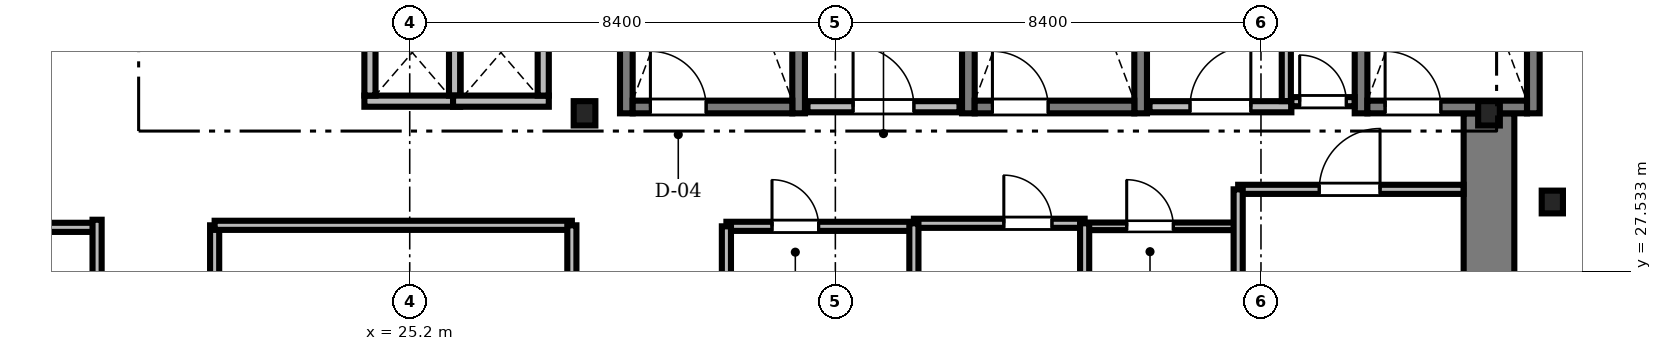
"""IFC4 building model, lengths in metres.
Left out: names, types, materials, properties, quantities, classifications, styles, units other than length and angle.
Written with IfcOpenShell. Run it as: python <this file> out.ifc"""

import sys

from ifc_helpers import new_model, si_unit, direction, frame, frame_2d, origin, origin_2d, place, context, subcontext, project, spatial, rectangle, i_section, extrude, source, transform, mapped, element, fill, save


model = new_model("IFC4")
c1 = context("Model", 3, precision=1e-05, world=origin(), true_north=direction((0.0, 1.0)))
c2 = subcontext(c1, "Body", "Model", "MODEL_VIEW")
j1 = project(units=[si_unit("LENGTHUNIT", "METRE"), si_unit("PLANEANGLEUNIT", "RADIAN")], contexts=[c1])
p1 = place(None, origin())
s1 = spatial("IfcSite", under=j1, at=p1, CompositionType="ELEMENT")
p2 = place(p1, origin())
s2 = spatial("IfcBuilding", under=s1, at=p2, CompositionType="ELEMENT")
p3 = place(p2, frame((0.0, 0.0, 45.85)))
s3 = spatial("IfcBuildingStorey", under=s2, at=p3, CompositionType="ELEMENT", Elevation=45.85)
m1 = source(origin(), c2, "Body", "SweptSolid", [
    extrude(rectangle(XDim=13.15, YDim=1.0, at=frame_2d((6.575, 0.0))), origin(), (0.0, 0.0, 1.0), 3.41),
])
p4 = place(p3, frame((46.5, 17.5, 0.0), z_axis=(0.0, 0.0, 1.0), x_axis=(0.0, 1.0, 0.0)))
e1 = element("IfcWall", 1, at=p4, inside=s3, PredefinedType="SHEAR", context=c2, shape_type="MappedRepresentation", body=[
    mapped(m1, transform((0.0, 0.0, 0.0), scale=1.0)),
])
m2 = source(origin(), c2, "Body", "SweptSolid", [
    extrude(i_section(OverallWidth=0.428, OverallDepth=0.481, WebThickness=0.04, FlangeThickness=0.063, FilletRadius=0.015, at=origin_2d()), origin(), (0.0, 0.0, 1.0), 3.41),
])
for number, where, z_axis, x_axis in (
    (2, (28.65, 30.65, 0.0), (0.0, 0.0, 1.0), (1.0, 0.0, 0.0)),
    (3, (46.5, 30.65, 0.0), (0.0, 0.0, 1.0), (1.0, 0.0, 0.0)),
):
    element("IfcColumn", number, at=place(p3, frame(where, z_axis=z_axis, x_axis=x_axis)), inside=s3, PredefinedType="COLUMN", context=c2, shape_type="MappedRepresentation", body=[
        mapped(m2, transform((0.0, 0.0, 0.0), scale=1.0)),
    ])
m3 = source(origin(), c2, "Body", "SweptSolid", [
    extrude(i_section(OverallWidth=0.419, OverallDepth=0.449, WebThickness=0.031, FlangeThickness=0.048, FilletRadius=0.015, at=origin_2d()), origin(), (0.0, 0.0, 1.0), 3.41),
])
p5 = place(p3, frame((47.75, 28.9, 0.0), z_axis=(0.0, 0.0, 1.0), x_axis=(1.0, 0.0, 0.0)))
e4 = element("IfcColumn", 4, at=p5, inside=s3, PredefinedType="COLUMN", context=c2, shape_type="MappedRepresentation", body=[
    mapped(m3, transform((0.0, 0.0, 0.0), scale=1.0)),
])
m4 = source(origin(), c2, "Body", "SweptSolid", [
    extrude(rectangle(XDim=9.15, YDim=0.25, at=frame_2d((4.575, 0.0))), origin(), (0.0, 0.0, 1.0), 3.45),
])
for number, where, z_axis, x_axis in (
    (5, (29.475, 30.65, 0.0), (0.0, 0.0, 1.0), (0.0, 1.0, 0.0)),
    (6, (32.875, 30.65, 0.0), (0.0, 0.0, 1.0), (0.0, 1.0, 0.0)),
):
    element("IfcWall", number, at=place(p3, frame(where, z_axis=z_axis, x_axis=x_axis)), inside=s3, PredefinedType="SOLIDWALL", context=c2, shape_type="MappedRepresentation", body=[
        mapped(m4, transform((0.0, 0.0, 0.0), scale=1.0)),
    ])
m5 = source(origin(), c2, "Body", "SweptSolid", [
    extrude(rectangle(XDim=3.15, YDim=0.25, at=frame_2d((1.575, 0.0))), origin(), (0.0, 0.0, 1.0), 3.45),
])
p6 = place(p3, frame((29.6, 30.775, 0.0), z_axis=(0.0, 0.0, 1.0), x_axis=(1.0, 0.0, 0.0)))
e7 = element("IfcWall", 7, at=p6, inside=s3, PredefinedType="SOLIDWALL", context=c2, shape_type="MappedRepresentation", body=[
    mapped(m5, transform((0.0, 0.0, 0.0), scale=1.0)),
])
m6 = source(origin(), c2, "Body", "SweptSolid", [
    extrude(rectangle(XDim=1.1, YDim=2.2, at=frame_2d((0.55, 1.1))), frame((0.0, 0.135, 0.0), z_axis=(0.0, -1.0, 0.0), x_axis=(1.0, 0.0, 0.0)), (0.0, 0.0, 1.0), 0.27),
])
p7 = place(p6, frame((0.35, 0.0, 0.0)))
e8 = element("IfcOpeningElement", 8, at=p7, cuts=e7, PredefinedType="OPENING", context=c2, shape_type="MappedRepresentation", body=[
    mapped(m6, transform((0.0, 0.0, 0.0), scale=1.0)),
])
for number, where, z_axis, x_axis in (
    (9, (36.225, 30.65, 0.0), (0.0, 0.0, 1.0), (0.0, 1.0, 0.0)),
    (10, (39.625, 30.65, 0.0), (0.0, 0.0, 1.0), (0.0, 1.0, 0.0)),
):
    element("IfcWall", number, at=place(p3, frame(where, z_axis=z_axis, x_axis=x_axis)), inside=s3, PredefinedType="SOLIDWALL", context=c2, shape_type="MappedRepresentation", body=[
        mapped(m4, transform((0.0, 0.0, 0.0), scale=1.0)),
    ])
p8 = place(p3, frame((36.35, 30.775, 0.0), z_axis=(0.0, 0.0, 1.0), x_axis=(1.0, 0.0, 0.0)))
e11 = element("IfcWall", 11, at=p8, inside=s3, PredefinedType="SOLIDWALL", context=c2, shape_type="MappedRepresentation", body=[
    mapped(m5, transform((0.0, 0.0, 0.0), scale=1.0)),
])
p9 = place(p8, frame((0.35, 0.0, 0.0)))
e12 = element("IfcOpeningElement", 12, at=p9, cuts=e11, PredefinedType="OPENING", context=c2, shape_type="MappedRepresentation", body=[
    mapped(m6, transform((0.0, 0.0, 0.0), scale=1.0)),
])
for number, where, z_axis, x_axis in (
    (13, (43.975, 30.65, 0.0), (0.0, 0.0, 1.0), (0.0, 1.0, 0.0)),
    (14, (47.375, 30.65, 0.0), (0.0, 0.0, 1.0), (0.0, 1.0, 0.0)),
):
    element("IfcWall", number, at=place(p3, frame(where, z_axis=z_axis, x_axis=x_axis)), inside=s3, PredefinedType="SOLIDWALL", context=c2, shape_type="MappedRepresentation", body=[
        mapped(m4, transform((0.0, 0.0, 0.0), scale=1.0)),
    ])
p10 = place(p3, frame((44.1, 30.775, 0.0), z_axis=(0.0, 0.0, 1.0), x_axis=(1.0, 0.0, 0.0)))
e15 = element("IfcWall", 15, at=p10, inside=s3, PredefinedType="SOLIDWALL", context=c2, shape_type="MappedRepresentation", body=[
    mapped(m5, transform((0.0, 0.0, 0.0), scale=1.0)),
])
p11 = place(p10, frame((0.35, 0.0, 0.0)))
e16 = element("IfcOpeningElement", 16, at=p11, cuts=e15, PredefinedType="OPENING", context=c2, shape_type="MappedRepresentation", body=[
    mapped(m6, transform((0.0, 0.0, 0.0), scale=1.0)),
])
m7 = source(origin(), c2, "Body", "SweptSolid", [
    extrude(rectangle(XDim=3.0, YDim=0.22, at=frame_2d((1.5, 0.0))), origin(), (0.0, 0.0, 1.0), 3.41),
])
p12 = place(p3, frame((33.05, 30.78, 0.0), z_axis=(0.0, 0.0, 1.0), x_axis=(1.0, 0.0, 0.0)))
e17 = element("IfcWall", 17, at=p12, inside=s3, PredefinedType="SOLIDWALL", context=c2, shape_type="MappedRepresentation", body=[
    mapped(m7, transform((0.0, 0.0, 0.0), scale=1.0)),
])
m8 = source(origin(), c2, "Body", "SweptSolid", [
    extrude(rectangle(XDim=1.2, YDim=2.2, at=frame_2d((0.6, 1.1))), frame((0.0, 0.12, 0.0), z_axis=(0.0, -1.0, 0.0), x_axis=(1.0, 0.0, 0.0)), (0.0, 0.0, 1.0), 0.24),
])
p13 = place(p12, frame((0.9, 0.0, 0.0)))
e18 = element("IfcOpeningElement", 18, at=p13, cuts=e17, PredefinedType="OPENING", context=c2, shape_type="MappedRepresentation", body=[
    mapped(m8, transform((0.0, 0.0, 0.0), scale=1.0)),
])
m9 = source(origin(), c2, "Body", "SweptSolid", [
    extrude(rectangle(XDim=2.8, YDim=0.22, at=frame_2d((1.4, 0.0))), origin(), (0.0, 0.0, 1.0), 3.41),
])
p14 = place(p3, frame((39.8, 30.78, 0.0), z_axis=(0.0, 0.0, 1.0), x_axis=(1.0, 0.0, 0.0)))
e19 = element("IfcWall", 19, at=p14, inside=s3, PredefinedType="SOLIDWALL", context=c2, shape_type="MappedRepresentation", body=[
    mapped(m9, transform((0.0, 0.0, 0.0), scale=1.0)),
])
p15 = place(p14, frame((0.8, 0.0, 0.0)))
e20 = element("IfcOpeningElement", 20, at=p15, cuts=e19, PredefinedType="OPENING", context=c2, shape_type="MappedRepresentation", body=[
    mapped(m8, transform((0.0, 0.0, 0.0), scale=1.0)),
])
m10 = source(origin(), c2, "Body", "SweptSolid", [
    extrude(rectangle(XDim=1.89, YDim=0.22, at=frame_2d((0.945, 0.0))), origin(), (0.0, 0.0, 1.0), 3.41),
])
p16 = place(p3, frame((24.305, 30.89, 0.0), z_axis=(0.0, 0.0, 1.0), x_axis=(1.0, 0.0, 0.0)))
e21 = element("IfcWall", 21, at=p16, inside=s3, PredefinedType="SOLIDWALL", context=c2, shape_type="MappedRepresentation", body=[
    mapped(m10, transform((0.0, 0.0, 0.0), scale=1.0)),
])
m11 = source(origin(), c2, "Body", "SweptSolid", [
    extrude(rectangle(XDim=1.7, YDim=0.22, at=frame_2d((0.85, 0.0))), origin(), (0.0, 0.0, 1.0), 3.41),
])
for number, where, z_axis, x_axis in (
    (22, (24.415, 31.0, 0.0), (0.0, 0.0, 1.0), (0.0, 1.0, 0.0)),
    (23, (26.085, 31.0, 0.0), (0.0, 0.0, 1.0), (0.0, 1.0, 0.0)),
):
    element("IfcWall", number, at=place(p3, frame(where, z_axis=z_axis, x_axis=x_axis)), inside=s3, PredefinedType="SOLIDWALL", context=c2, shape_type="MappedRepresentation", body=[
        mapped(m11, transform((0.0, 0.0, 0.0), scale=1.0)),
    ])
p17 = place(p3, frame((26.055, 30.89, 0.0), z_axis=(0.0, 0.0, 1.0), x_axis=(1.0, 0.0, 0.0)))
e24 = element("IfcWall", 24, at=p17, inside=s3, PredefinedType="SOLIDWALL", context=c2, shape_type="MappedRepresentation", body=[
    mapped(m10, transform((0.0, 0.0, 0.0), scale=1.0)),
])
p18 = place(p3, frame((27.835, 31.0, 0.0), z_axis=(0.0, 0.0, 1.0), x_axis=(0.0, 1.0, 0.0)))
e25 = element("IfcWall", 25, at=p18, inside=s3, PredefinedType="SOLIDWALL", context=c2, shape_type="MappedRepresentation", body=[
    mapped(m11, transform((0.0, 0.0, 0.0), scale=1.0)),
])
m12 = source(origin(), c2, "Body", "SweptSolid", [
    extrude(rectangle(XDim=4.448, YDim=0.18, at=frame_2d((2.224, 0.0))), origin(), (0.0, 0.0, 1.0), 3.042),
])
p19 = place(p3, frame((41.55, 29.15, 0.0), z_axis=(0.0, 0.0, 1.0), x_axis=(1.0, 0.0, 0.0)))
e26 = element("IfcWall", 26, at=p19, inside=s3, PredefinedType="PARTITIONING", context=c2, shape_type="MappedRepresentation", body=[
    mapped(m12, transform((0.0, 0.0, 0.0), scale=1.0)),
])
m13 = source(origin(), c2, "Body", "SweptSolid", [
    extrude(rectangle(XDim=1.2, YDim=2.2, at=frame_2d((0.6, 1.1))), frame((0.0, 0.1, 0.0), z_axis=(0.0, -1.0, 0.0), x_axis=(1.0, 0.0, 0.0)), (0.0, 0.0, 1.0), 0.2),
])
p20 = place(p19, frame((1.6, 0.0, 0.0)))
e27 = element("IfcOpeningElement", 27, at=p20, cuts=e26, PredefinedType="OPENING", context=c2, shape_type="MappedRepresentation", body=[
    mapped(m13, transform((0.0, 0.0, 0.0), scale=1.0)),
])
m14 = source(origin(), c2, "Body", "SweptSolid", [
    extrude(rectangle(XDim=4.24, YDim=0.18, at=frame_2d((2.12, 0.0))), origin(), (0.0, 0.0, 1.0), 2.802),
])
p21 = place(p3, frame((21.35, 24.2, 0.0), z_axis=(0.0, 0.0, 1.0), x_axis=(0.0, 1.0, 0.0)))
e28 = element("IfcWall", 28, at=p21, inside=s3, PredefinedType="PARTITIONING", context=c2, shape_type="MappedRepresentation", body=[
    mapped(m14, transform((0.0, 0.0, 0.0), scale=1.0)),
])
m15 = source(origin(), c2, "Body", "SweptSolid", [
    extrude(rectangle(XDim=1.05, YDim=2.2, at=frame_2d((0.525, 1.1))), frame((0.0, 0.1, 0.0), z_axis=(0.0, -1.0, 0.0), x_axis=(1.0, 0.0, 0.0)), (0.0, 0.0, 1.0), 0.2),
])
p22 = place(p21, frame((1.4, 0.0, 0.0)))
e29 = element("IfcOpeningElement", 29, at=p22, cuts=e28, PredefinedType="OPENING", context=c2, shape_type="MappedRepresentation", body=[
    mapped(m15, transform((0.0, 0.0, 0.0), scale=1.0)),
])
m16 = source(origin(), c2, "Body", "SweptSolid", [
    extrude(rectangle(XDim=3.7, YDim=0.18, at=frame_2d((1.85, 0.0))), origin(), (0.0, 0.0, 1.0), 3.042),
])
p23 = place(p3, frame((31.45, 28.42, 0.0), z_axis=(0.0, 0.0, 1.0), x_axis=(1.0, 0.0, 0.0)))
e30 = element("IfcWall", 30, at=p23, inside=s3, PredefinedType="PARTITIONING", context=c2, shape_type="MappedRepresentation", body=[
    mapped(m16, transform((0.0, 0.0, 0.0), scale=1.0)),
])
m17 = source(origin(), c2, "Body", "SweptSolid", [
    extrude(rectangle(XDim=0.92, YDim=2.1, at=frame_2d((0.46, 1.05))), frame((0.0, 0.1, 0.0), z_axis=(0.0, -1.0, 0.0), x_axis=(1.0, 0.0, 0.0)), (0.0, 0.0, 1.0), 0.2),
])
p24 = place(p23, frame((0.9, 0.0, 0.0)))
e31 = element("IfcOpeningElement", 31, at=p24, cuts=e30, PredefinedType="OPENING", context=c2, shape_type="MappedRepresentation", body=[
    mapped(m17, transform((0.0, 0.0, 0.0), scale=1.0)),
])
m18 = source(origin(), c2, "Body", "SweptSolid", [
    extrude(rectangle(XDim=3.37, YDim=0.18, at=frame_2d((1.685, 0.0))), origin(), (0.0, 0.0, 1.0), 3.41),
])
p25 = place(p3, frame((35.15, 28.48, 0.0), z_axis=(0.0, 0.0, 1.0), x_axis=(1.0, 0.0, 0.0)))
e32 = element("IfcWall", 32, at=p25, inside=s3, PredefinedType="PARTITIONING", context=c2, shape_type="MappedRepresentation", body=[
    mapped(m18, transform((0.0, 0.0, 0.0), scale=1.0)),
])
m19 = source(origin(), c2, "Body", "SweptSolid", [
    extrude(rectangle(XDim=0.95, YDim=2.15, at=frame_2d((0.475, 1.075))), frame((0.0, 0.1, 0.0), z_axis=(0.0, -1.0, 0.0), x_axis=(1.0, 0.0, 0.0)), (0.0, 0.0, 1.0), 0.2),
])
p26 = place(p25, frame((1.775, 0.0, 0.0)))
e33 = element("IfcOpeningElement", 33, at=p26, cuts=e32, PredefinedType="OPENING", context=c2, shape_type="MappedRepresentation", body=[
    mapped(m19, transform((0.0, 0.0, 0.0), scale=1.0)),
])
m20 = source(origin(), c2, "Body", "SweptSolid", [
    extrude(rectangle(XDim=3.0, YDim=0.15, at=frame_2d((1.5, 0.0))), origin(), (0.0, 0.0, 1.0), 3.41),
])
p27 = place(p3, frame((38.52, 28.42, 0.0), z_axis=(0.0, 0.0, 1.0), x_axis=(1.0, 0.0, 0.0)))
e34 = element("IfcWall", 34, at=p27, inside=s3, PredefinedType="PARTITIONING", context=c2, shape_type="MappedRepresentation", body=[
    mapped(m20, transform((0.0, 0.0, 0.0), scale=1.0)),
])
m21 = source(origin(), c2, "Body", "SweptSolid", [
    extrude(rectangle(XDim=0.92, YDim=2.1, at=frame_2d((0.46, 1.05))), frame((0.0, 0.085, 0.0), z_axis=(0.0, -1.0, 0.0), x_axis=(1.0, 0.0, 0.0)), (0.0, 0.0, 1.0), 0.17),
])
p28 = place(p27, frame((0.83, 0.0, 0.0)))
e35 = element("IfcOpeningElement", 35, at=p28, cuts=e34, PredefinedType="OPENING", context=c2, shape_type="MappedRepresentation", body=[
    mapped(m21, transform((0.0, 0.0, 0.0), scale=1.0)),
])
m22 = source(origin(), c2, "Body", "SweptSolid", [
    extrude(rectangle(XDim=1.248, YDim=0.18, at=frame_2d((0.624, 0.0))), origin(), (0.0, 0.0, 1.0), 3.41),
])
p29 = place(p3, frame((42.6, 30.88, 0.0), z_axis=(0.0, 0.0, 1.0), x_axis=(1.0, 0.0, 0.0)))
e36 = element("IfcWall", 36, at=p29, inside=s3, PredefinedType="PARTITIONING", context=c2, shape_type="MappedRepresentation", body=[
    mapped(m22, transform((0.0, 0.0, 0.0), scale=1.0)),
])
p30 = place(p29, frame((0.164, 0.0, 0.0)))
e37 = element("IfcOpeningElement", 37, at=p30, cuts=e36, PredefinedType="OPENING", context=c2, shape_type="MappedRepresentation", body=[
    mapped(m17, transform((0.0, 0.0, 0.0), scale=1.0)),
])
m23 = source(origin(), c2, "Body", "SweptSolid", [
    extrude(rectangle(XDim=16.8, YDim=0.18, at=frame_2d((8.4, 0.0))), origin(), (0.0, 0.0, 1.0), 2.652),
])
p31 = place(p3, frame((2.23, 28.4, 0.0), z_axis=(0.0, 0.0, 1.0), x_axis=(1.0, 0.0, 0.0)))
e38 = element("IfcWall", 38, at=p31, inside=s3, PredefinedType="PARTITIONING", context=c2, shape_type="MappedRepresentation", body=[
    mapped(m23, transform((0.0, 0.0, 0.0), scale=1.0)),
])
m24 = source(origin(), c2, "Body", "SweptSolid", [
    extrude(rectangle(XDim=13.79, YDim=0.18, at=frame_2d((6.895, 0.0))), origin(), (0.0, 0.0, 1.0), 2.802),
])
p32 = place(p3, frame((19.03, 14.76, 0.0), z_axis=(0.0, 0.0, 1.0), x_axis=(0.0, 1.0, 0.0)))
e39 = element("IfcWall", 39, at=p32, inside=s3, PredefinedType="PARTITIONING", context=c2, shape_type="MappedRepresentation", body=[
    mapped(m24, transform((0.0, 0.0, 0.0), scale=1.0)),
])
m25 = source(origin(), c2, "Body", "SweptSolid", [
    extrude(rectangle(XDim=7.05, YDim=0.18, at=frame_2d((3.525, 0.0))), origin(), (0.0, 0.0, 1.0), 3.41),
])
p33 = place(p3, frame((21.35, 28.44, 0.0), z_axis=(0.0, 0.0, 1.0), x_axis=(1.0, 0.0, 0.0)))
e40 = element("IfcWall", 40, at=p33, inside=s3, PredefinedType="PARTITIONING", context=c2, shape_type="MappedRepresentation", body=[
    mapped(m25, transform((0.0, 0.0, 0.0), scale=1.0)),
])
p34 = place(p3, frame((28.4, 24.2, 0.0), z_axis=(0.0, 0.0, 1.0), x_axis=(0.0, 1.0, 0.0)))
e41 = element("IfcWall", 41, at=p34, inside=s3, PredefinedType="PARTITIONING", context=c2, shape_type="MappedRepresentation", body=[
    mapped(m14, transform((0.0, 0.0, 0.0), scale=1.0)),
])
m26 = source(origin(), c2, "Body", "SweptSolid", [
    extrude(rectangle(XDim=2.35, YDim=0.18, at=frame_2d((1.175, 0.0))), origin(), (0.0, 0.0, 1.0), 2.802),
])
p35 = place(p3, frame((41.55, 26.8, 0.0), z_axis=(0.0, 0.0, 1.0), x_axis=(0.0, 1.0, 0.0)))
e42 = element("IfcWall", 42, at=p35, inside=s3, PredefinedType="PARTITIONING", context=c2, shape_type="MappedRepresentation", body=[
    mapped(m26, transform((0.0, 0.0, 0.0), scale=1.0)),
])
m27 = source(origin(), c2, "Body", "SweptSolid", [
    extrude(rectangle(XDim=1.858, YDim=0.18, at=frame_2d((0.929, 0.0))), origin(), (0.0, 0.0, 1.0), 3.41),
])
p36 = place(p3, frame((42.5, 30.892, 0.0), z_axis=(0.0, 0.0, 1.0), x_axis=(0.0, 1.0, 0.0)))
e43 = element("IfcWall", 43, at=p36, inside=s3, PredefinedType="PARTITIONING", context=c2, shape_type="MappedRepresentation", body=[
    mapped(m27, transform((0.0, 0.0, 0.0), scale=1.0)),
])
m28 = source(origin(), c2, "Body", "SweptSolid", [
    extrude(rectangle(XDim=1.66, YDim=0.18, at=frame_2d((0.83, 0.0))), origin(), (0.0, 0.0, 1.0), 2.952),
])
for number, where, z_axis, x_axis in (
    (44, (35.15, 26.82, 0.0), (0.0, 0.0, 1.0), (0.0, 1.0, 0.0)),
    (45, (38.52, 26.82, 0.0), (0.0, 0.0, 1.0), (0.0, 1.0, 0.0)),
):
    element("IfcWall", number, at=place(p3, frame(where, z_axis=z_axis, x_axis=x_axis)), inside=s3, PredefinedType="PARTITIONING", context=c2, shape_type="MappedRepresentation", body=[
        mapped(m28, transform((0.0, 0.0, 0.0), scale=1.0)),
    ])
m29 = source(origin(), c2, "Body", "SweptSolid", [
    extrude(rectangle(XDim=1.6, YDim=0.18, at=frame_2d((0.8, 0.0))), origin(), (0.0, 0.0, 1.0), 2.952),
])
p37 = place(p3, frame((31.45, 26.82, 0.0), z_axis=(0.0, 0.0, 1.0), x_axis=(0.0, 1.0, 0.0)))
e46 = element("IfcWall", 46, at=p37, inside=s3, PredefinedType="PARTITIONING", context=c2, shape_type="MappedRepresentation", body=[
    mapped(m29, transform((0.0, 0.0, 0.0), scale=1.0)),
])
m30 = source(origin(), c2, "Body", "SweptSolid", [
    extrude(rectangle(XDim=1.1, YDim=2.2, at=frame_2d((0.55, 1.1))), frame((0.0, 0.025, 0.0), z_axis=(0.0, -1.0, 0.0), x_axis=(1.0, 0.0, 0.0)), (0.0, 0.0, 1.0), 0.05),
])
p38 = place(p7, origin())
e47 = element("IfcDoor", 47, at=p38, inside=s3, OperationType="SINGLE_SWING_LEFT", PredefinedType="DOOR", context=c2, shape_type="MappedRepresentation", body=[
    mapped(m30, transform((0.0, 0.0, 0.0), scale=1.0)),
])
fill(e8, e47)
p39 = place(p9, origin())
e48 = element("IfcDoor", 48, at=p39, inside=s3, OperationType="SINGLE_SWING_LEFT", PredefinedType="DOOR", context=c2, shape_type="MappedRepresentation", body=[
    mapped(m30, transform((0.0, 0.0, 0.0), scale=1.0)),
])
fill(e12, e48)
p40 = place(p11, origin())
e49 = element("IfcDoor", 49, at=p40, inside=s3, OperationType="SINGLE_SWING_LEFT", PredefinedType="DOOR", context=c2, shape_type="MappedRepresentation", body=[
    mapped(m30, transform((0.0, 0.0, 0.0), scale=1.0)),
])
fill(e16, e49)
m31 = source(origin(), c2, "Body", "SweptSolid", [
    extrude(rectangle(XDim=1.2, YDim=2.2, at=frame_2d((0.6, 1.1))), frame((0.0, 0.025, 0.0), z_axis=(0.0, -1.0, 0.0), x_axis=(1.0, 0.0, 0.0)), (0.0, 0.0, 1.0), 0.05),
])
p41 = place(p13, origin())
e50 = element("IfcDoor", 50, at=p41, inside=s3, OperationType="SINGLE_SWING_LEFT", PredefinedType="DOOR", context=c2, shape_type="MappedRepresentation", body=[
    mapped(m31, transform((0.0, 0.0, 0.0), scale=1.0)),
])
fill(e18, e50)
p42 = place(p15, origin())
e51 = element("IfcDoor", 51, at=p42, inside=s3, OperationType="SINGLE_SWING_RIGHT", PredefinedType="DOOR", context=c2, shape_type="MappedRepresentation", body=[
    mapped(m31, transform((0.0, 0.0, 0.0), scale=1.0)),
])
fill(e20, e51)
p43 = place(p20, origin())
e52 = element("IfcDoor", 52, at=p43, inside=s3, OperationType="SINGLE_SWING_RIGHT", PredefinedType="DOOR", context=c2, shape_type="MappedRepresentation", body=[
    mapped(m31, transform((0.0, 0.0, 0.0), scale=1.0)),
])
fill(e27, e52)
m32 = source(origin(), c2, "Body", "SweptSolid", [
    extrude(rectangle(XDim=0.92, YDim=2.1, at=frame_2d((0.46, 1.05))), frame((0.0, 0.025, 0.0), z_axis=(0.0, -1.0, 0.0), x_axis=(1.0, 0.0, 0.0)), (0.0, 0.0, 1.0), 0.05),
])
p44 = place(p24, origin())
e53 = element("IfcDoor", 53, at=p44, inside=s3, OperationType="SINGLE_SWING_LEFT", PredefinedType="DOOR", context=c2, shape_type="MappedRepresentation", body=[
    mapped(m32, transform((0.0, 0.0, 0.0), scale=1.0)),
])
fill(e31, e53)
m33 = source(origin(), c2, "Body", "SweptSolid", [
    extrude(rectangle(XDim=0.95, YDim=2.15, at=frame_2d((0.475, 1.075))), frame((0.0, 0.025, 0.0), z_axis=(0.0, -1.0, 0.0), x_axis=(1.0, 0.0, 0.0)), (0.0, 0.0, 1.0), 0.05),
])
p45 = place(p26, origin())
e54 = element("IfcDoor", 54, at=p45, inside=s3, OperationType="SINGLE_SWING_LEFT", PredefinedType="DOOR", context=c2, shape_type="MappedRepresentation", body=[
    mapped(m33, transform((0.0, 0.0, 0.0), scale=1.0)),
])
fill(e33, e54)
p46 = place(p28, origin())
e55 = element("IfcDoor", 55, at=p46, inside=s3, OperationType="SINGLE_SWING_LEFT", PredefinedType="DOOR", context=c2, shape_type="MappedRepresentation", body=[
    mapped(m32, transform((0.0, 0.0, 0.0), scale=1.0)),
])
fill(e35, e55)
p47 = place(p30, origin())
e56 = element("IfcDoor", 56, at=p47, inside=s3, OperationType="SINGLE_SWING_LEFT", PredefinedType="DOOR", context=c2, shape_type="MappedRepresentation", body=[
    mapped(m32, transform((0.0, 0.0, 0.0), scale=1.0)),
])
fill(e37, e56)
save(model, sys.argv[1])
